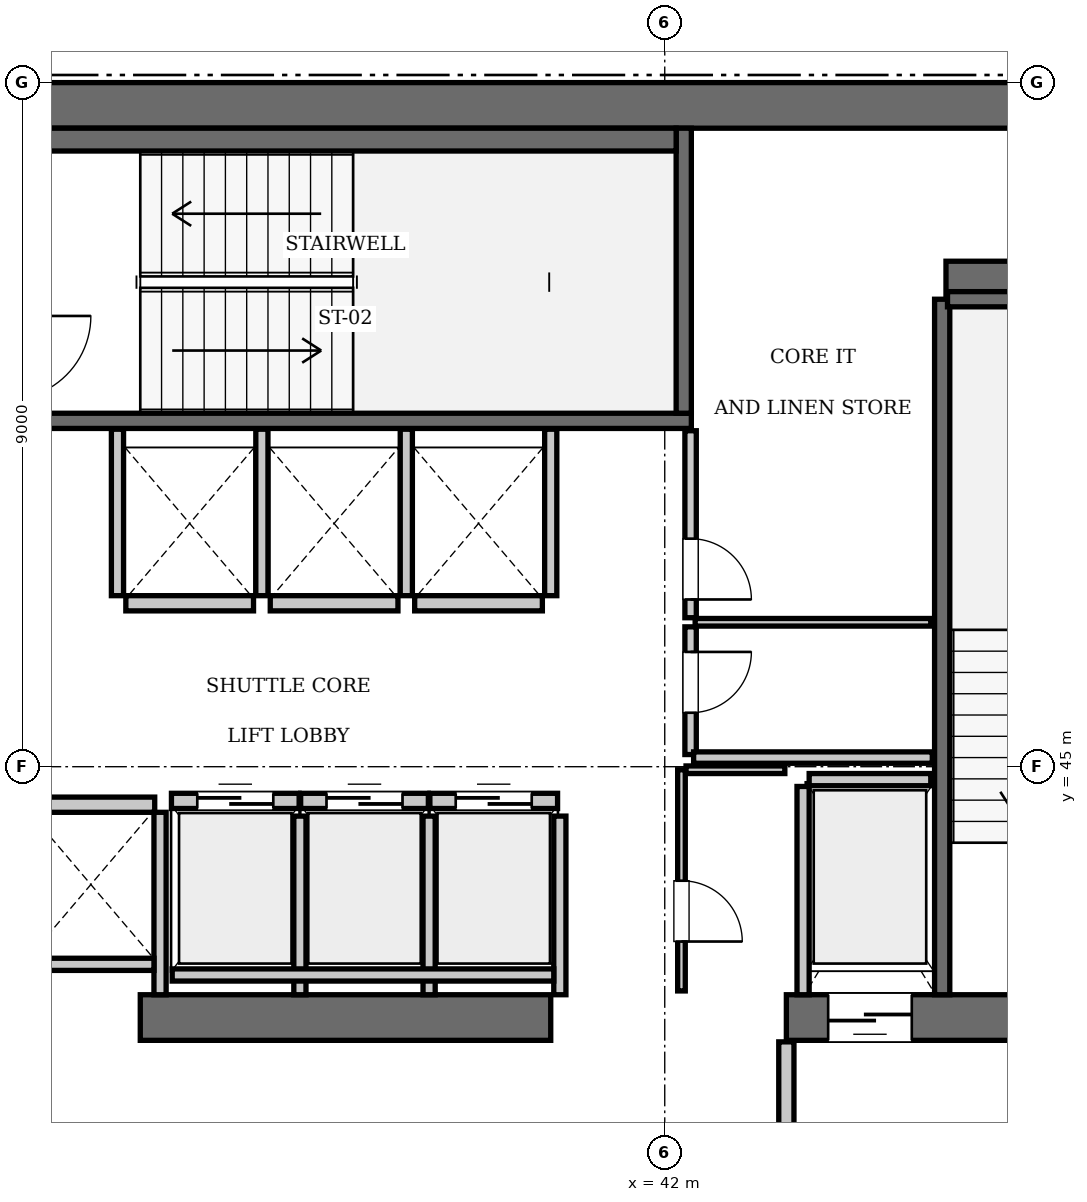
"""IFC4 building model, lengths in metres.
Left out: names, types, materials, properties, quantities, classifications, styles, units other than length and angle.
Written with IfcOpenShell. Run it as: python <this file> out.ifc"""

import sys

from ifc_helpers import new_model, si_unit, direction, frame, frame_2d, origin, place, context, subcontext, project, spatial, rectangle, extrude, element, fill, save


model = new_model("IFC4")
c1 = context("Model", 3, precision=1e-05, world=origin(), true_north=direction((0.0, 1.0)))
c2 = subcontext(c1, "Body", "Model", "MODEL_VIEW")
j1 = project(units=[si_unit("LENGTHUNIT", "METRE"), si_unit("PLANEANGLEUNIT", "RADIAN")], contexts=[c1])
p1 = place(None, origin())
s1 = spatial("IfcSite", under=j1, at=p1, CompositionType="ELEMENT")
p2 = place(p1, origin())
s2 = spatial("IfcBuilding", under=s1, at=p2, CompositionType="ELEMENT")
p3 = place(p2, frame((0.0, 0.0, 250.95)))
s3 = spatial("IfcBuildingStorey", under=s2, at=p3, CompositionType="ELEMENT", Elevation=250.95)
p4 = place(p3, frame((25.2, 53.7, 0.0), z_axis=(0.0, 0.0, 1.0), x_axis=(1.0, 0.0, 0.0)))
e1 = element("IfcWall", 1, at=p4, inside=s3, PredefinedType="SHEAR", context=c2, shape_type="SweptSolid", body=[
    extrude(rectangle(XDim=25.2, YDim=0.6, at=frame_2d((12.6, 0.0))), origin(), (0.0, 0.0, 1.0), 3.85),
])
p5 = place(p3, frame((35.1, 41.7, 0.0), z_axis=(0.0, 0.0, 1.0), x_axis=(1.0, 0.0, 0.0)))
e2 = element("IfcWall", 2, at=p5, inside=s3, PredefinedType="SHEAR", context=c2, shape_type="SweptSolid", body=[
    extrude(rectangle(XDim=5.4, YDim=0.6, at=frame_2d((2.7, 0.0))), origin(), (0.0, 0.0, 1.0), 3.85),
])
p6 = place(p3, frame((43.6, 41.7, 0.0), z_axis=(0.0, 0.0, 1.0), x_axis=(1.0, 0.0, 0.0)))
e3 = element("IfcWall", 3, at=p6, inside=s3, PredefinedType="SHEAR", context=c2, shape_type="SweptSolid", body=[
    extrude(rectangle(XDim=6.8, YDim=0.6, at=frame_2d((3.4, 0.0))), origin(), (0.0, 0.0, 1.0), 3.85),
])
p7 = place(p6, frame((3.9, 0.0, 0.0)))
e4 = element("IfcOpeningElement", 4, at=p7, cuts=e3, PredefinedType="OPENING", context=c2, shape_type="SweptSolid", body=[
    extrude(rectangle(XDim=1.15, YDim=2.15, at=frame_2d((0.575, 1.075))), frame((0.0, 0.31, 0.0), z_axis=(0.0, -1.0, 0.0), x_axis=(1.0, 0.0, 0.0)), (0.0, 0.0, 1.0), 0.62),
])
p8 = place(p6, frame((0.55, 0.0, 0.0)))
e5 = element("IfcOpeningElement", 5, at=p8, cuts=e3, PredefinedType="OPENING", context=c2, shape_type="SweptSolid", body=[
    extrude(rectangle(XDim=1.1, YDim=2.2, at=frame_2d((0.55, 1.1))), frame((0.0, 0.31, 0.0), z_axis=(0.0, -1.0, 0.0), x_axis=(1.0, 0.0, 0.0)), (0.0, 0.0, 1.0), 0.62),
])
p9 = place(p3, frame((45.7, 51.4, 0.0), z_axis=(0.0, 0.0, 1.0), x_axis=(1.0, 0.0, 0.0)))
e6 = element("IfcWall", 6, at=p9, inside=s3, PredefinedType="SHEAR", context=c2, shape_type="SweptSolid", body=[
    extrude(rectangle(XDim=4.1, YDim=0.5, at=frame_2d((2.05, 0.0))), origin(), (0.0, 0.0, 1.0), 3.85),
])
p10 = place(p3, frame((33.25, 49.55, 0.0), z_axis=(0.0, 0.0, 1.0), x_axis=(1.0, 0.0, 0.0)))
e7 = element("IfcWall", 7, at=p10, inside=s3, PredefinedType="SOLIDWALL", context=c2, shape_type="SweptSolid", body=[
    extrude(rectangle(XDim=9.1, YDim=0.2, at=frame_2d((4.55, 0.0))), origin(), (0.0, 0.0, 1.0), 3.61),
])
p11 = place(p3, frame((42.25, 49.65, 0.0), z_axis=(0.0, 0.0, 1.0), x_axis=(0.0, 1.0, 0.0)))
e8 = element("IfcWall", 8, at=p11, inside=s3, PredefinedType="SOLIDWALL", context=c2, shape_type="SweptSolid", body=[
    extrude(rectangle(XDim=3.75, YDim=0.2, at=frame_2d((1.875, 0.0))), origin(), (0.0, 0.0, 1.0), 3.61),
])
p12 = place(p3, frame((33.45, 53.25, 0.0), z_axis=(0.0, 0.0, 1.0), x_axis=(1.0, 0.0, 0.0)))
e9 = element("IfcWall", 9, at=p12, inside=s3, PredefinedType="SOLIDWALL", context=c2, shape_type="SweptSolid", body=[
    extrude(rectangle(XDim=8.7, YDim=0.3, at=frame_2d((4.35, 0.0))), origin(), (0.0, 0.0, 1.0), 3.61),
])
p13 = place(p3, frame((45.65, 42.0, 0.0), z_axis=(0.0, 0.0, 1.0), x_axis=(0.0, 1.0, 0.0)))
e10 = element("IfcWall", 10, at=p13, inside=s3, PredefinedType="SOLIDWALL", context=c2, shape_type="SweptSolid", body=[
    extrude(rectangle(XDim=9.15, YDim=0.2, at=frame_2d((4.575, 0.0))), origin(), (0.0, 0.0, 1.0), 3.61),
])
p14 = place(p3, frame((45.72, 51.15, 0.0), z_axis=(0.0, 0.0, 1.0), x_axis=(1.0, 0.0, 0.0)))
e11 = element("IfcWall", 11, at=p14, inside=s3, PredefinedType="SOLIDWALL", context=c2, shape_type="SweptSolid", body=[
    extrude(rectangle(XDim=3.5, YDim=0.2, at=frame_2d((1.75, 0.0))), origin(), (0.0, 0.0, 1.0), 3.61),
])
p15 = place(p3, frame((35.51, 44.55, 0.0), z_axis=(0.0, 0.0, 1.0), x_axis=(1.0, 0.0, 0.0)))
e12 = element("IfcWall", 12, at=p15, inside=s3, PredefinedType="SOLIDWALL", context=c2, shape_type="SweptSolid", body=[
    extrude(rectangle(XDim=1.68, YDim=0.2, at=frame_2d((0.84, 0.0))), origin(), (0.0, 0.0, 1.0), 3.61),
])
p16 = place(p15, frame((0.34, 0.0, 0.0)))
e13 = element("IfcOpeningElement", 13, at=p16, cuts=e12, PredefinedType="OPENING", context=c2, shape_type="SweptSolid", body=[
    extrude(rectangle(XDim=1.0, YDim=2.15, at=frame_2d((0.5, 1.075))), frame((0.0, 0.11, 0.0), z_axis=(0.0, -1.0, 0.0), x_axis=(1.0, 0.0, 0.0)), (0.0, 0.0, 1.0), 0.22),
])
p17 = place(p3, frame((37.21, 44.55, 0.0), z_axis=(0.0, 0.0, 1.0), x_axis=(1.0, 0.0, 0.0)))
e14 = element("IfcWall", 14, at=p17, inside=s3, PredefinedType="SOLIDWALL", context=c2, shape_type="SweptSolid", body=[
    extrude(rectangle(XDim=1.68, YDim=0.2, at=frame_2d((0.84, 0.0))), origin(), (0.0, 0.0, 1.0), 3.61),
])
p18 = place(p17, frame((0.34, 0.0, 0.0)))
e15 = element("IfcOpeningElement", 15, at=p18, cuts=e14, PredefinedType="OPENING", context=c2, shape_type="SweptSolid", body=[
    extrude(rectangle(XDim=1.0, YDim=2.15, at=frame_2d((0.5, 1.075))), frame((0.0, 0.11, 0.0), z_axis=(0.0, -1.0, 0.0), x_axis=(1.0, 0.0, 0.0)), (0.0, 0.0, 1.0), 0.22),
])
p19 = place(p3, frame((38.91, 44.55, 0.0), z_axis=(0.0, 0.0, 1.0), x_axis=(1.0, 0.0, 0.0)))
e16 = element("IfcWall", 16, at=p19, inside=s3, PredefinedType="SOLIDWALL", context=c2, shape_type="SweptSolid", body=[
    extrude(rectangle(XDim=1.68, YDim=0.2, at=frame_2d((0.84, 0.0))), origin(), (0.0, 0.0, 1.0), 3.61),
])
p20 = place(p19, frame((0.34, 0.0, 0.0)))
e17 = element("IfcOpeningElement", 17, at=p20, cuts=e16, PredefinedType="OPENING", context=c2, shape_type="SweptSolid", body=[
    extrude(rectangle(XDim=1.0, YDim=2.15, at=frame_2d((0.5, 1.075))), frame((0.0, 0.11, 0.0), z_axis=(0.0, -1.0, 0.0), x_axis=(1.0, 0.0, 0.0)), (0.0, 0.0, 1.0), 0.22),
])
p21 = place(p3, frame((34.91, 47.15, 0.0), z_axis=(0.0, 0.0, 1.0), x_axis=(1.0, 0.0, 0.0)))
e18 = element("IfcWall", 18, at=p21, inside=s3, PredefinedType="SOLIDWALL", context=c2, shape_type="SweptSolid", body=[
    extrude(rectangle(XDim=1.68, YDim=0.2, at=frame_2d((0.84, 0.0))), origin(), (0.0, 0.0, 1.0), 3.61),
])
for number, where, z_axis, x_axis in (
    (19, (36.81, 47.15, 0.0), (0.0, 0.0, 1.0), (1.0, 0.0, 0.0)),
    (20, (38.71, 47.15, 0.0), (0.0, 0.0, 1.0), (1.0, 0.0, 0.0)),
    (21, (33.61, 44.5, 0.0), (0.0, 0.0, 1.0), (1.0, 0.0, 0.0)),
):
    element("IfcWall", number, at=place(p3, frame(where, z_axis=z_axis, x_axis=x_axis)), inside=s3, PredefinedType="SOLIDWALL", context=c2, shape_type="SweptSolid", body=[
        extrude(rectangle(XDim=1.68, YDim=0.2, at=frame_2d((0.84, 0.0))), origin(), (0.0, 0.0, 1.0), 3.61),
    ])
p22 = place(p3, frame((43.9, 44.83, 0.0), z_axis=(0.0, 0.0, 1.0), x_axis=(1.0, 0.0, 0.0)))
e22 = element("IfcWall", 22, at=p22, inside=s3, PredefinedType="SOLIDWALL", context=c2, shape_type="SweptSolid", body=[
    extrude(rectangle(XDim=1.6, YDim=0.16, at=frame_2d((0.8, 0.0))), origin(), (0.0, 0.0, 1.0), 3.61),
])
p23 = place(p3, frame((43.82, 42.0, 0.0), z_axis=(0.0, 0.0, 1.0), x_axis=(0.0, 1.0, 0.0)))
e23 = element("IfcWall", 23, at=p23, inside=s3, PredefinedType="SOLIDWALL", context=c2, shape_type="SweptSolid", body=[
    extrude(rectangle(XDim=2.74, YDim=0.16, at=frame_2d((1.37, 0.0))), origin(), (0.0, 0.0, 1.0), 3.61),
])
for number, where, z_axis, x_axis in (
    (24, (37.2, 42.0, 0.0), (0.0, 0.0, 1.0), (0.0, 1.0, 0.0)),
    (25, (38.9, 42.0, 0.0), (0.0, 0.0, 1.0), (0.0, 1.0, 0.0)),
    (26, (40.62, 42.0, 0.0), (0.0, 0.0, 1.0), (0.0, 1.0, 0.0)),
):
    element("IfcWall", number, at=place(p3, frame(where, z_axis=z_axis, x_axis=x_axis)), inside=s3, PredefinedType="SOLIDWALL", context=c2, shape_type="SweptSolid", body=[
        extrude(rectangle(XDim=2.35, YDim=0.16, at=frame_2d((1.175, 0.0))), origin(), (0.0, 0.0, 1.0), 3.61),
    ])
p24 = place(p3, frame((35.52, 42.26, 0.0), z_axis=(0.0, 0.0, 1.0), x_axis=(1.0, 0.0, 0.0)))
e27 = element("IfcWall", 27, at=p24, inside=s3, PredefinedType="SOLIDWALL", context=c2, shape_type="SweptSolid", body=[
    extrude(rectangle(XDim=5.02, YDim=0.16, at=frame_2d((2.51, 0.0))), origin(), (0.0, 0.0, 1.0), 3.61),
])
for number, where, z_axis, x_axis in (
    (28, (34.8, 47.25, 0.0), (0.0, 0.0, 1.0), (0.0, 1.0, 0.0)),
    (29, (36.7, 47.25, 0.0), (0.0, 0.0, 1.0), (0.0, 1.0, 0.0)),
    (30, (38.6, 47.25, 0.0), (0.0, 0.0, 1.0), (0.0, 1.0, 0.0)),
    (31, (40.5, 47.25, 0.0), (0.0, 0.0, 1.0), (0.0, 1.0, 0.0)),
):
    element("IfcWall", number, at=place(p3, frame(where, z_axis=z_axis, x_axis=x_axis)), inside=s3, PredefinedType="SOLIDWALL", context=c2, shape_type="SweptSolid", body=[
        extrude(rectangle(XDim=2.19, YDim=0.16, at=frame_2d((1.095, 0.0))), origin(), (0.0, 0.0, 1.0), 3.61),
    ])
p25 = place(p3, frame((35.36, 42.0, 0.0), z_axis=(0.0, 0.0, 1.0), x_axis=(0.0, 1.0, 0.0)))
e32 = element("IfcWall", 32, at=p25, inside=s3, PredefinedType="SOLIDWALL", context=c2, shape_type="SweptSolid", body=[
    extrude(rectangle(XDim=2.4, YDim=0.16, at=frame_2d((1.2, 0.0))), origin(), (0.0, 0.0, 1.0), 3.61),
])
p26 = place(p3, frame((33.62, 42.4, 0.0), z_axis=(0.0, 0.0, 1.0), x_axis=(1.0, 0.0, 0.0)))
e33 = element("IfcWall", 33, at=p26, inside=s3, PredefinedType="SOLIDWALL", context=c2, shape_type="SweptSolid", body=[
    extrude(rectangle(XDim=1.66, YDim=0.16, at=frame_2d((0.83, 0.0))), origin(), (0.0, 0.0, 1.0), 3.61),
])
p27 = place(p3, frame((43.6, 38.31, 0.0), z_axis=(0.0, 0.0, 1.0), x_axis=(0.0, 1.0, 0.0)))
e34 = element("IfcWall", 34, at=p27, inside=s3, PredefinedType="PARTITIONING", context=c2, shape_type="SweptSolid", body=[
    extrude(rectangle(XDim=3.07, YDim=0.2, at=frame_2d((1.535, 0.0))), origin(), (0.0, 0.0, 1.0), 3.61),
])
p28 = place(p3, frame((42.22, 42.05, 0.0), z_axis=(0.0, 0.0, 1.0), x_axis=(0.0, 1.0, 0.0)))
e35 = element("IfcWall", 35, at=p28, inside=s3, PredefinedType="PARTITIONING", context=c2, shape_type="SweptSolid", body=[
    extrude(rectangle(XDim=2.91, YDim=0.1, at=frame_2d((1.455, 0.0))), origin(), (0.0, 0.0, 1.0), 3.61),
])
p29 = place(p28, frame((0.65, 0.0, 0.0)))
e36 = element("IfcOpeningElement", 36, at=p29, cuts=e35, PredefinedType="OPENING", context=c2, shape_type="SweptSolid", body=[
    extrude(rectangle(XDim=0.8, YDim=2.05, at=frame_2d((0.4, 1.025))), frame((0.0, 0.06, 0.0), z_axis=(0.0, -1.0, 0.0), x_axis=(1.0, 0.0, 0.0)), (0.0, 0.0, 1.0), 0.12),
])
p30 = place(p3, frame((42.28, 44.96, 0.0), z_axis=(0.0, 0.0, 1.0), x_axis=(1.0, 0.0, 0.0)))
e37 = element("IfcWall", 37, at=p30, inside=s3, PredefinedType="PARTITIONING", context=c2, shape_type="SweptSolid", body=[
    extrude(rectangle(XDim=1.3, YDim=0.1, at=frame_2d((0.65, 0.0))), origin(), (0.0, 0.0, 1.0), 3.61),
])
p31 = place(p3, frame((42.34, 45.16, 0.0), z_axis=(0.0, 0.0, 1.0), x_axis=(0.0, 1.0, 0.0)))
e38 = element("IfcWall", 38, at=p31, inside=s3, PredefinedType="PARTITIONING", context=c2, shape_type="SweptSolid", body=[
    extrude(rectangle(XDim=1.68, YDim=0.15, at=frame_2d((0.84, 0.0))), origin(), (0.0, 0.0, 1.0), 3.61),
])
p32 = place(p31, frame((0.55, 0.0, 0.0)))
e39 = element("IfcOpeningElement", 39, at=p32, cuts=e38, PredefinedType="OPENING", context=c2, shape_type="SweptSolid", body=[
    extrude(rectangle(XDim=0.8, YDim=2.05, at=frame_2d((0.4, 1.025))), frame((0.0, 0.085, 0.0), z_axis=(0.0, -1.0, 0.0), x_axis=(1.0, 0.0, 0.0)), (0.0, 0.0, 1.0), 0.17),
])
p33 = place(p3, frame((42.34, 46.96, 0.0), z_axis=(0.0, 0.0, 1.0), x_axis=(0.0, 1.0, 0.0)))
e40 = element("IfcWall", 40, at=p33, inside=s3, PredefinedType="PARTITIONING", context=c2, shape_type="SweptSolid", body=[
    extrude(rectangle(XDim=2.46, YDim=0.15, at=frame_2d((1.23, 0.0))), origin(), (0.0, 0.0, 1.0), 3.61),
])
p34 = place(p33, frame((0.24, 0.0, 0.0)))
e41 = element("IfcOpeningElement", 41, at=p34, cuts=e40, PredefinedType="OPENING", context=c2, shape_type="SweptSolid", body=[
    extrude(rectangle(XDim=0.8, YDim=2.05, at=frame_2d((0.4, 1.025))), frame((0.0, 0.085, 0.0), z_axis=(0.0, -1.0, 0.0), x_axis=(1.0, 0.0, 0.0)), (0.0, 0.0, 1.0), 0.17),
])
p35 = place(p3, frame((42.4, 46.9, 0.0), z_axis=(0.0, 0.0, 1.0), x_axis=(1.0, 0.0, 0.0)))
e42 = element("IfcWall", 42, at=p35, inside=s3, PredefinedType="PARTITIONING", context=c2, shape_type="SweptSolid", body=[
    extrude(rectangle(XDim=3.1, YDim=0.1, at=frame_2d((1.55, 0.0))), origin(), (0.0, 0.0, 1.0), 3.61),
])
p36 = place(p3, frame((42.38, 45.12, 0.0), z_axis=(0.0, 0.0, 1.0), x_axis=(1.0, 0.0, 0.0)))
e43 = element("IfcWall", 43, at=p36, inside=s3, PredefinedType="PARTITIONING", context=c2, shape_type="SweptSolid", body=[
    extrude(rectangle(XDim=3.14, YDim=0.15, at=frame_2d((1.57, 0.0))), origin(), (0.0, 0.0, 1.0), 3.61),
])
p37 = place(p16, origin())
e44 = element("IfcDoor", 44, at=p37, inside=s3, OperationType="SLIDING_TO_LEFT", PredefinedType="DOOR", context=c2, shape_type="SweptSolid", body=[
    extrude(rectangle(XDim=1.0, YDim=2.15, at=frame_2d((0.5, 1.075))), frame((0.0, 0.025, 0.0), z_axis=(0.0, -1.0, 0.0), x_axis=(1.0, 0.0, 0.0)), (0.0, 0.0, 1.0), 0.05),
])
fill(e13, e44)
p38 = place(p18, origin())
e45 = element("IfcDoor", 45, at=p38, inside=s3, OperationType="SLIDING_TO_LEFT", PredefinedType="DOOR", context=c2, shape_type="SweptSolid", body=[
    extrude(rectangle(XDim=1.0, YDim=2.15, at=frame_2d((0.5, 1.075))), frame((0.0, 0.025, 0.0), z_axis=(0.0, -1.0, 0.0), x_axis=(1.0, 0.0, 0.0)), (0.0, 0.0, 1.0), 0.05),
])
fill(e15, e45)
p39 = place(p20, origin())
e46 = element("IfcDoor", 46, at=p39, inside=s3, OperationType="SLIDING_TO_LEFT", PredefinedType="DOOR", context=c2, shape_type="SweptSolid", body=[
    extrude(rectangle(XDim=1.0, YDim=2.15, at=frame_2d((0.5, 1.075))), frame((0.0, 0.025, 0.0), z_axis=(0.0, -1.0, 0.0), x_axis=(1.0, 0.0, 0.0)), (0.0, 0.0, 1.0), 0.05),
])
fill(e17, e46)
p40 = place(p8, frame((1.1, 0.0, 0.0), z_axis=(0.0, 0.0, 1.0), x_axis=(-1.0, 0.0, 0.0)))
e47 = element("IfcDoor", 47, at=p40, inside=s3, OperationType="SLIDING_TO_LEFT", PredefinedType="DOOR", context=c2, shape_type="SweptSolid", body=[
    extrude(rectangle(XDim=1.1, YDim=2.2, at=frame_2d((0.55, 1.1))), frame((0.0, 0.025, 0.0), z_axis=(0.0, -1.0, 0.0), x_axis=(1.0, 0.0, 0.0)), (0.0, 0.0, 1.0), 0.05),
])
fill(e5, e47)
p41 = place(p29, frame((0.8, 0.0, 0.0), z_axis=(0.0, 0.0, 1.0), x_axis=(-1.0, 0.0, 0.0)))
e48 = element("IfcDoor", 48, at=p41, inside=s3, OperationType="SINGLE_SWING_RIGHT", PredefinedType="DOOR", context=c2, shape_type="SweptSolid", body=[
    extrude(rectangle(XDim=0.8, YDim=2.05, at=frame_2d((0.4, 1.025))), frame((0.0, 0.025, 0.0), z_axis=(0.0, -1.0, 0.0), x_axis=(1.0, 0.0, 0.0)), (0.0, 0.0, 1.0), 0.05),
])
fill(e36, e48)
p42 = place(p32, frame((0.8, 0.0, 0.0), z_axis=(0.0, 0.0, 1.0), x_axis=(-1.0, 0.0, 0.0)))
e49 = element("IfcDoor", 49, at=p42, inside=s3, OperationType="SINGLE_SWING_LEFT", PredefinedType="DOOR", context=c2, shape_type="SweptSolid", body=[
    extrude(rectangle(XDim=0.8, YDim=2.05, at=frame_2d((0.4, 1.025))), frame((0.0, 0.025, 0.0), z_axis=(0.0, -1.0, 0.0), x_axis=(1.0, 0.0, 0.0)), (0.0, 0.0, 1.0), 0.05),
])
fill(e39, e49)
p43 = place(p34, frame((0.8, 0.0, 0.0), z_axis=(0.0, 0.0, 1.0), x_axis=(-1.0, 0.0, 0.0)))
e50 = element("IfcDoor", 50, at=p43, inside=s3, OperationType="SINGLE_SWING_RIGHT", PredefinedType="DOOR", context=c2, shape_type="SweptSolid", body=[
    extrude(rectangle(XDim=0.8, YDim=2.05, at=frame_2d((0.4, 1.025))), frame((0.0, 0.025, 0.0), z_axis=(0.0, -1.0, 0.0), x_axis=(1.0, 0.0, 0.0)), (0.0, 0.0, 1.0), 0.05),
])
fill(e41, e50)
save(model, sys.argv[1])
